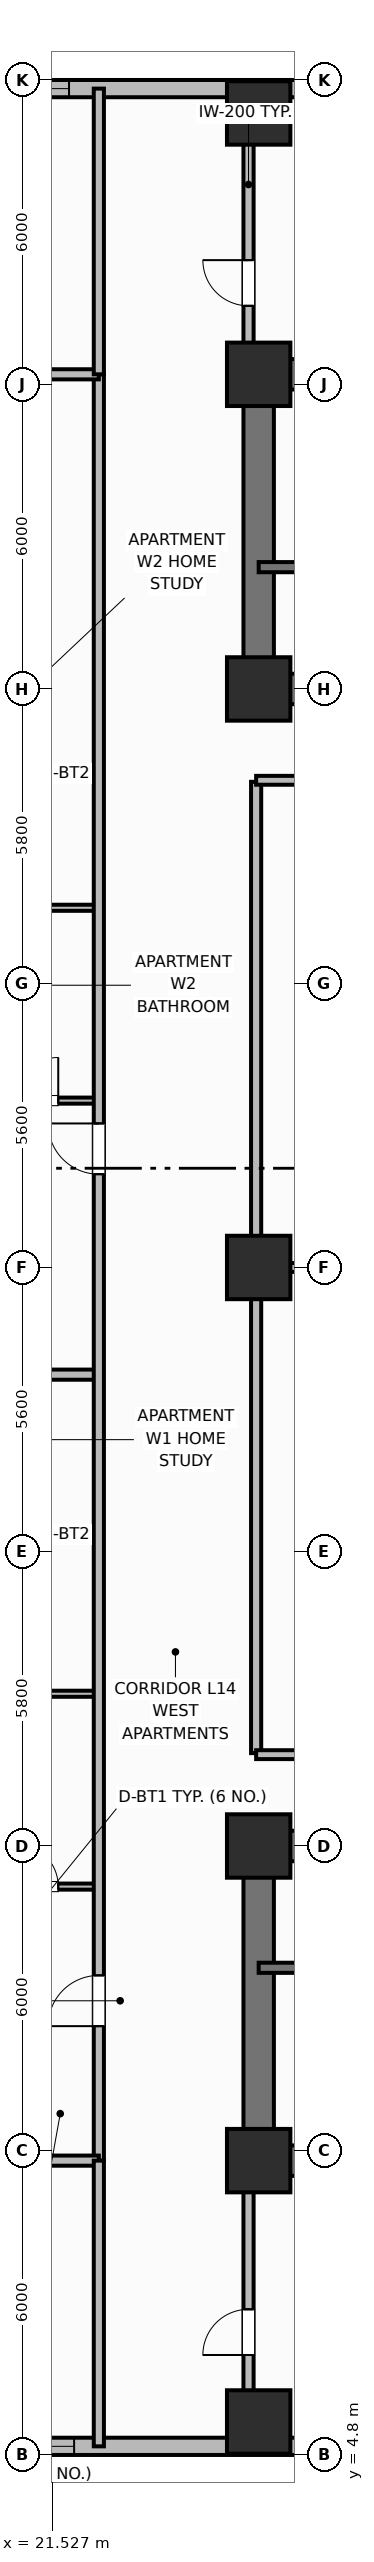
"""IFC4 building model, lengths in metres.
Left out: names, types, materials, properties, quantities, classifications, styles, units other than length and angle.
Written with IfcOpenShell. Run it as: python <this file> out.ifc"""

import sys

from ifc_helpers import new_model, si_unit, direction, frame, frame_2d, origin, origin_2d, place, context, subcontext, project, spatial, rectangle, extrude, element, fill, save


model = new_model("IFC4")
c1 = context("Model", 3, precision=1e-05, world=origin(), true_north=direction((0.0, 1.0)))
c2 = subcontext(c1, "Body", "Model", "MODEL_VIEW")
j1 = project(units=[si_unit("LENGTHUNIT", "METRE"), si_unit("PLANEANGLEUNIT", "RADIAN")], contexts=[c1])
p1 = place(None, origin())
s1 = spatial("IfcSite", under=j1, at=p1, CompositionType="ELEMENT")
p2 = place(p1, origin())
s2 = spatial("IfcBuilding", under=s1, at=p2, CompositionType="ELEMENT")
p3 = place(p2, frame((0.0, 0.0, 58.4)))
s3 = spatial("IfcBuildingStorey", under=s2, at=p3, CompositionType="ELEMENT", Elevation=58.4)
p4 = place(p3, frame((52.8, 10.6, 0.0), z_axis=(0.0, 0.0, 1.0), x_axis=(-1.0, 0.0, 0.0)))
e1 = element("IfcWall", 1, at=p4, inside=s3, PredefinedType="SHEAR", context=c2, shape_type="SweptSolid", body=[
    extrude(rectangle(XDim=27.2, YDim=0.6, at=frame_2d((13.6, 0.0))), origin(), (0.0, 0.0, 1.0), 3.7),
])
p5 = place(p3, frame((25.6, 10.9, 0.0), z_axis=(0.0, 0.0, 1.0), x_axis=(0.0, 1.0, 0.0)))
e2 = element("IfcWall", 2, at=p5, inside=s3, PredefinedType="SHEAR", context=c2, shape_type="SweptSolid", body=[
    extrude(rectangle(XDim=5.6, YDim=0.6, at=frame_2d((2.8, 0.0))), origin(), (0.0, 0.0, 1.0), 3.7),
])
p6 = place(p3, frame((25.6, 16.8, 0.0), z_axis=(0.0, 0.0, 1.0), x_axis=(1.0, 0.0, 0.0)))
e3 = element("IfcWall", 3, at=p6, inside=s3, PredefinedType="SHEAR", context=c2, shape_type="SweptSolid", body=[
    extrude(rectangle(XDim=27.2, YDim=0.6, at=frame_2d((13.6, 0.0))), origin(), (0.0, 0.0, 1.0), 3.7),
])
p7 = place(p6, frame((1.9, 0.0, 0.0)))
e4 = element("IfcOpeningElement", 4, at=p7, cuts=e3, PredefinedType="OPENING", context=c2, shape_type="SweptSolid", body=[
    extrude(rectangle(XDim=1.1, YDim=2.15, at=frame_2d((0.55, 1.075))), frame((0.0, 0.31, 0.0), z_axis=(0.0, -1.0, 0.0), x_axis=(1.0, 0.0, 0.0)), (0.0, 0.0, 1.0), 0.62),
])
p8 = place(p6, frame((13.0, 0.0, 0.0)))
e5 = element("IfcOpeningElement", 5, at=p8, cuts=e3, PredefinedType="OPENING", context=c2, shape_type="SweptSolid", body=[
    extrude(rectangle(XDim=1.2, YDim=2.15, at=frame_2d((0.6, 1.075))), frame((0.0, 0.31, 0.0), z_axis=(0.0, -1.0, 0.0), x_axis=(1.0, 0.0, 0.0)), (0.0, 0.0, 1.0), 0.62),
])
p9 = place(p6, frame((20.4, 0.0, 0.0)))
e6 = element("IfcOpeningElement", 6, at=p9, cuts=e3, PredefinedType="OPENING", context=c2, shape_type="SweptSolid", body=[
    extrude(rectangle(XDim=1.3, YDim=2.2, at=frame_2d((0.65, 1.1))), frame((0.0, 0.31, 0.0), z_axis=(0.0, -1.0, 0.0), x_axis=(1.0, 0.0, 0.0)), (0.0, 0.0, 1.0), 0.62),
])
p10 = place(p6, frame((24.65, 0.0, 0.0)))
e7 = element("IfcOpeningElement", 7, at=p10, cuts=e3, PredefinedType="OPENING", context=c2, shape_type="SweptSolid", body=[
    extrude(rectangle(XDim=0.85, YDim=2.1, at=frame_2d((0.425, 1.05))), frame((0.0, 0.31, 0.0), z_axis=(0.0, -1.0, 0.0), x_axis=(1.0, 0.0, 0.0)), (0.0, 0.0, 1.0), 0.62),
])
p11 = place(p3, frame((25.6, 45.8, 0.0), z_axis=(0.0, 0.0, 1.0), x_axis=(1.0, 0.0, 0.0)))
e8 = element("IfcWall", 8, at=p11, inside=s3, PredefinedType="SHEAR", context=c2, shape_type="SweptSolid", body=[
    extrude(rectangle(XDim=27.2, YDim=0.6, at=frame_2d((13.6, 0.0))), origin(), (0.0, 0.0, 1.0), 3.7),
])
p12 = place(p3, frame((25.6, 39.9, 0.0), z_axis=(0.0, 0.0, 1.0), x_axis=(0.0, 1.0, 0.0)))
e9 = element("IfcWall", 9, at=p12, inside=s3, PredefinedType="SHEAR", context=c2, shape_type="SweptSolid", body=[
    extrude(rectangle(XDim=5.6, YDim=0.6, at=frame_2d((2.8, 0.0))), origin(), (0.0, 0.0, 1.0), 3.7),
])
p13 = place(p3, frame((52.8, 39.6, 0.0), z_axis=(0.0, 0.0, 1.0), x_axis=(-1.0, 0.0, 0.0)))
e10 = element("IfcWall", 10, at=p13, inside=s3, PredefinedType="SHEAR", context=c2, shape_type="SweptSolid", body=[
    extrude(rectangle(XDim=27.2, YDim=0.6, at=frame_2d((13.6, 0.0))), origin(), (0.0, 0.0, 1.0), 3.7),
])
p14 = place(p13, frame((24.2, 0.0, 0.0)))
e11 = element("IfcOpeningElement", 11, at=p14, cuts=e10, PredefinedType="OPENING", context=c2, shape_type="SweptSolid", body=[
    extrude(rectangle(XDim=1.1, YDim=2.15, at=frame_2d((0.55, 1.075))), frame((0.0, 0.31, 0.0), z_axis=(0.0, -1.0, 0.0), x_axis=(1.0, 0.0, 0.0)), (0.0, 0.0, 1.0), 0.62),
])
p15 = place(p13, frame((15.1, 0.0, 0.0)))
e12 = element("IfcOpeningElement", 12, at=p15, cuts=e10, PredefinedType="OPENING", context=c2, shape_type="SweptSolid", body=[
    extrude(rectangle(XDim=1.2, YDim=2.15, at=frame_2d((0.6, 1.075))), frame((0.0, 0.31, 0.0), z_axis=(0.0, -1.0, 0.0), x_axis=(1.0, 0.0, 0.0)), (0.0, 0.0, 1.0), 0.62),
])
p16 = place(p13, frame((11.6, 0.0, 0.0)))
e13 = element("IfcOpeningElement", 13, at=p16, cuts=e10, PredefinedType="OPENING", context=c2, shape_type="SweptSolid", body=[
    extrude(rectangle(XDim=0.9, YDim=2.1, at=frame_2d((0.45, 1.05))), frame((0.0, 0.31, 0.0), z_axis=(0.0, -1.0, 0.0), x_axis=(1.0, 0.0, 0.0)), (0.0, 0.0, 1.0), 0.62),
])
p17 = place(p13, frame((3.6, 0.0, 0.0)))
e14 = element("IfcOpeningElement", 14, at=p17, cuts=e10, PredefinedType="OPENING", context=c2, shape_type="SweptSolid", body=[
    extrude(rectangle(XDim=1.0, YDim=2.15, at=frame_2d((0.5, 1.075))), frame((0.0, 0.31, 0.0), z_axis=(0.0, -1.0, 0.0), x_axis=(1.0, 0.0, 0.0)), (0.0, 0.0, 1.0), 0.62),
])
for number, where, z_axis, x_axis in (
    (15, (25.6, 10.6, 0.0), (0.0, 0.0, 1.0), (1.0, 0.0, 0.0)),
    (16, (25.6, 16.8, 0.0), (0.0, 0.0, 1.0), (1.0, 0.0, 0.0)),
    (17, (25.6, 39.6, 0.0), (0.0, 0.0, 1.0), (1.0, 0.0, 0.0)),
    (18, (25.6, 45.8, 0.0), (0.0, 0.0, 1.0), (1.0, 0.0, 0.0)),
    (19, (25.6, 28.2, 0.0), (0.0, 0.0, 1.0), (1.0, 0.0, 0.0)),
    (20, (25.6, 5.45, 0.0), (0.0, 0.0, 1.0), (1.0, 0.0, 0.0)),
    (21, (25.6, 50.95, 0.0), (0.0, 0.0, 1.0), (1.0, 0.0, 0.0)),
):
    element("IfcColumn", number, at=place(p3, frame(where, z_axis=z_axis, x_axis=x_axis)), inside=s3, PredefinedType="COLUMN", context=c2, shape_type="SweptSolid", body=[
        extrude(rectangle(XDim=1.25, YDim=1.25, at=origin_2d()), origin(), (0.0, 0.0, 1.0), 3.7),
    ])
p18 = place(p3, frame((18.6, 4.97, 0.0), z_axis=(0.0, 0.0, 1.0), x_axis=(1.0, 0.0, 0.0)))
e22 = element("IfcWall", 22, at=p18, inside=s3, PredefinedType="SOLIDWALL", context=c2, shape_type="SweptSolid", body=[
    extrude(rectangle(XDim=17.4, YDim=0.34, at=frame_2d((8.7, 0.0))), origin(), (0.0, 0.0, 1.0), 2.7),
])
p19 = place(p18, frame((1.262, 0.0, 0.68)))
e23 = element("IfcOpeningElement", 23, at=p19, cuts=e22, PredefinedType="OPENING", context=c2, shape_type="SweptSolid", body=[
    extrude(rectangle(XDim=2.1, YDim=1.9, at=frame_2d((1.05, 0.95))), frame((0.0, 0.18, 0.0), z_axis=(0.0, -1.0, 0.0), x_axis=(1.0, 0.0, 0.0)), (0.0, 0.0, 1.0), 0.36),
])
p20 = place(p18, frame((9.663, 0.0, 0.68)))
e24 = element("IfcOpeningElement", 24, at=p20, cuts=e22, PredefinedType="OPENING", context=c2, shape_type="SweptSolid", body=[
    extrude(rectangle(XDim=2.1, YDim=1.9, at=frame_2d((1.05, 0.95))), frame((0.0, 0.18, 0.0), z_axis=(0.0, -1.0, 0.0), x_axis=(1.0, 0.0, 0.0)), (0.0, 0.0, 1.0), 0.36),
])
p21 = place(p18, frame((12.988, 0.0, 0.68)))
e25 = element("IfcOpeningElement", 25, at=p21, cuts=e22, PredefinedType="OPENING", context=c2, shape_type="SweptSolid", body=[
    extrude(rectangle(XDim=2.1, YDim=1.9, at=frame_2d((1.05, 0.95))), frame((0.0, 0.18, 0.0), z_axis=(0.0, -1.0, 0.0), x_axis=(1.0, 0.0, 0.0)), (0.0, 0.0, 1.0), 0.36),
])
p22 = place(p3, frame((27.55, 51.43, 0.0), z_axis=(0.0, 0.0, 1.0), x_axis=(-1.0, 0.0, 0.0)))
e26 = element("IfcWall", 26, at=p22, inside=s3, PredefinedType="SOLIDWALL", context=c2, shape_type="SweptSolid", body=[
    extrude(rectangle(XDim=8.95, YDim=0.34, at=frame_2d((4.475, 0.0))), origin(), (0.0, 0.0, 1.0), 2.7),
])
p23 = place(p22, frame((5.688, 0.0, 0.73)))
e27 = element("IfcOpeningElement", 27, at=p23, cuts=e26, PredefinedType="OPENING", context=c2, shape_type="SweptSolid", body=[
    extrude(rectangle(XDim=1.4, YDim=1.85, at=frame_2d((0.7, 0.925))), frame((0.0, 0.18, 0.0), z_axis=(0.0, -1.0, 0.0), x_axis=(1.0, 0.0, 0.0)), (0.0, 0.0, 1.0), 0.36),
])
p24 = place(p3, frame((25.6, 14.4, 0.0), z_axis=(0.0, 0.0, 1.0), x_axis=(1.0, 0.0, 0.0)))
e28 = element("IfcWall", 28, at=p24, inside=s3, PredefinedType="SHEAR", context=c2, shape_type="SweptSolid", body=[
    extrude(rectangle(XDim=9.55, YDim=0.2, at=frame_2d((4.775, 0.0))), origin(), (0.0, 0.0, 1.0), 3.7),
])
p25 = place(p24, frame((1.05, 0.0, 0.0)))
e29 = element("IfcOpeningElement", 29, at=p25, cuts=e28, PredefinedType="OPENING", context=c2, shape_type="SweptSolid", body=[
    extrude(rectangle(XDim=1.1, YDim=2.15, at=frame_2d((0.55, 1.075))), frame((0.0, 0.11, 0.0), z_axis=(0.0, -1.0, 0.0), x_axis=(1.0, 0.0, 0.0)), (0.0, 0.0, 1.0), 0.22),
])
p26 = place(p3, frame((35.15, 42.0, 0.0), z_axis=(0.0, 0.0, 1.0), x_axis=(-1.0, 0.0, 0.0)))
e30 = element("IfcWall", 30, at=p26, inside=s3, PredefinedType="SHEAR", context=c2, shape_type="SweptSolid", body=[
    extrude(rectangle(XDim=9.55, YDim=0.2, at=frame_2d((4.775, 0.0))), origin(), (0.0, 0.0, 1.0), 3.7),
])
p27 = place(p26, frame((7.25, 0.0, 0.0)))
e31 = element("IfcOpeningElement", 31, at=p27, cuts=e30, PredefinedType="OPENING", context=c2, shape_type="SweptSolid", body=[
    extrude(rectangle(XDim=1.1, YDim=2.15, at=frame_2d((0.55, 1.075))), frame((0.0, 0.11, 0.0), z_axis=(0.0, -1.0, 0.0), x_axis=(1.0, 0.0, 0.0)), (0.0, 0.0, 1.0), 0.22),
])
p28 = place(p3, frame((25.55, 18.63, 0.0), z_axis=(0.0, 0.0, 1.0), x_axis=(0.0, 1.0, 0.0)))
e32 = element("IfcWall", 32, at=p28, inside=s3, PredefinedType="PARTITIONING", context=c2, shape_type="SweptSolid", body=[
    extrude(rectangle(XDim=19.14, YDim=0.2, at=frame_2d((9.57, 0.0))), origin(), (0.0, 0.0, 1.0), 2.53),
])
for number, where, z_axis, x_axis in (
    (33, (25.55, 18.6, 0.0), (0.0, 0.0, 1.0), (1.0, 0.0, 0.0)),
    (34, (25.55, 37.8, 0.0), (0.0, 0.0, 1.0), (1.0, 0.0, 0.0)),
):
    element("IfcWall", number, at=place(p3, frame(where, z_axis=z_axis, x_axis=x_axis)), inside=s3, PredefinedType="PARTITIONING", context=c2, shape_type="SweptSolid", body=[
        extrude(rectangle(XDim=14.9, YDim=0.175, at=frame_2d((7.45, 0.0))), origin(), (0.0, 0.0, 1.0), 2.53),
    ])
p29 = place(p3, frame((25.6, 28.2, 0.0), z_axis=(0.0, 0.0, 1.0), x_axis=(1.0, 0.0, 0.0)))
e35 = element("IfcWall", 35, at=p29, inside=s3, PredefinedType="PARTITIONING", context=c2, shape_type="SweptSolid", body=[
    extrude(rectangle(XDim=14.87, YDim=0.175, at=frame_2d((7.435, 0.0))), origin(), (0.0, 0.0, 1.0), 2.53),
])
p30 = place(p3, frame((20.2, 16.0, 0.0), z_axis=(0.0, 0.0, 1.0), x_axis=(1.0, 0.0, 0.0)))
e36 = element("IfcWall", 36, at=p30, inside=s3, PredefinedType="PARTITIONING", context=c2, shape_type="SweptSolid", body=[
    extrude(rectangle(XDim=2.25, YDim=0.12, at=frame_2d((1.125, 0.0))), origin(), (0.0, 0.0, 1.0), 2.53),
])
p31 = place(p30, frame((0.6, 0.0, 0.0)))
e37 = element("IfcOpeningElement", 37, at=p31, cuts=e36, PredefinedType="OPENING", context=c2, shape_type="SweptSolid", body=[
    extrude(rectangle(XDim=0.85, YDim=2.1, at=frame_2d((0.425, 1.05))), frame((0.0, 0.07, 0.0), z_axis=(0.0, -1.0, 0.0), x_axis=(1.0, 0.0, 0.0)), (0.0, 0.0, 1.0), 0.14),
])
p32 = place(p3, frame((20.2, 19.8, 0.0), z_axis=(0.0, 0.0, 1.0), x_axis=(1.0, 0.0, 0.0)))
e38 = element("IfcWall", 38, at=p32, inside=s3, PredefinedType="PARTITIONING", context=c2, shape_type="SweptSolid", body=[
    extrude(rectangle(XDim=2.25, YDim=0.12, at=frame_2d((1.125, 0.0))), origin(), (0.0, 0.0, 1.0), 2.53),
])
p33 = place(p3, frame((15.226, 26.088, 0.0), z_axis=(0.0, 0.0, 1.0), x_axis=(1.0, 0.0, 0.0)))
e39 = element("IfcWall", 39, at=p33, inside=s3, PredefinedType="PARTITIONING", context=c2, shape_type="SweptSolid", body=[
    extrude(rectangle(XDim=7.224, YDim=0.2, at=frame_2d((3.612, 0.0))), origin(), (0.0, 0.0, 1.0), 2.53),
])
p34 = place(p3, frame((20.2, 31.488, 0.0), z_axis=(0.0, 0.0, 1.0), x_axis=(1.0, 0.0, 0.0)))
e40 = element("IfcWall", 40, at=p34, inside=s3, PredefinedType="PARTITIONING", context=c2, shape_type="SweptSolid", body=[
    extrude(rectangle(XDim=2.25, YDim=0.12, at=frame_2d((1.125, 0.0))), origin(), (0.0, 0.0, 1.0), 2.53),
])
p35 = place(p34, frame((0.6, 0.0, 0.0)))
e41 = element("IfcOpeningElement", 41, at=p35, cuts=e40, PredefinedType="OPENING", context=c2, shape_type="SweptSolid", body=[
    extrude(rectangle(XDim=0.85, YDim=2.1, at=frame_2d((0.425, 1.05))), frame((0.0, 0.07, 0.0), z_axis=(0.0, -1.0, 0.0), x_axis=(1.0, 0.0, 0.0)), (0.0, 0.0, 1.0), 0.14),
])
p36 = place(p3, frame((20.2, 35.288, 0.0), z_axis=(0.0, 0.0, 1.0), x_axis=(1.0, 0.0, 0.0)))
e42 = element("IfcWall", 42, at=p36, inside=s3, PredefinedType="PARTITIONING", context=c2, shape_type="SweptSolid", body=[
    extrude(rectangle(XDim=2.25, YDim=0.12, at=frame_2d((1.125, 0.0))), origin(), (0.0, 0.0, 1.0), 2.53),
])
p37 = place(p3, frame((22.45, 10.6, 0.0), z_axis=(0.0, 0.0, 1.0), x_axis=(0.0, 1.0, 0.0)))
e43 = element("IfcWall", 43, at=p37, inside=s3, PredefinedType="PARTITIONING", context=c2, shape_type="SweptSolid", body=[
    extrude(rectangle(XDim=35.2, YDim=0.2, at=frame_2d((17.6, 0.0))), origin(), (0.0, 0.0, 1.0), 2.53),
])
p38 = place(p37, frame((2.65, 0.0, 0.0)))
e44 = element("IfcOpeningElement", 44, at=p38, cuts=e43, PredefinedType="OPENING", context=c2, shape_type="SweptSolid", body=[
    extrude(rectangle(XDim=1.0, YDim=2.15, at=frame_2d((0.5, 1.075))), frame((0.0, 0.11, 0.0), z_axis=(0.0, -1.0, 0.0), x_axis=(1.0, 0.0, 0.0)), (0.0, 0.0, 1.0), 0.22),
])
p39 = place(p37, frame((19.438, 0.0, 0.0)))
e45 = element("IfcOpeningElement", 45, at=p39, cuts=e43, PredefinedType="OPENING", context=c2, shape_type="SweptSolid", body=[
    extrude(rectangle(XDim=1.0, YDim=2.15, at=frame_2d((0.5, 1.075))), frame((0.0, 0.11, 0.0), z_axis=(0.0, -1.0, 0.0), x_axis=(1.0, 0.0, 0.0)), (0.0, 0.0, 1.0), 0.22),
])
for number, where, z_axis, x_axis in (
    (46, (14.99, 10.6, 0.0), (0.0, 0.0, 1.0), (1.0, 0.0, 0.0)),
    (47, (14.99, 45.8, 0.0), (0.0, 0.0, 1.0), (1.0, 0.0, 0.0)),
):
    element("IfcWall", number, at=place(p3, frame(where, z_axis=z_axis, x_axis=x_axis)), inside=s3, PredefinedType="PARTITIONING", context=c2, shape_type="SweptSolid", body=[
        extrude(rectangle(XDim=7.46, YDim=0.2, at=frame_2d((3.73, 0.0))), origin(), (0.0, 0.0, 1.0), 2.53),
    ])
p40 = place(p3, frame((22.45, 4.97, 0.0), z_axis=(0.0, 0.0, 1.0), x_axis=(0.0, 1.0, 0.0)))
e48 = element("IfcWall", 48, at=p40, inside=s3, PredefinedType="PARTITIONING", context=c2, shape_type="SweptSolid", body=[
    extrude(rectangle(XDim=5.63, YDim=0.2, at=frame_2d((2.815, 0.0))), origin(), (0.0, 0.0, 1.0), 2.53),
])
p41 = place(p3, frame((22.45, 45.8, 0.0), z_axis=(0.0, 0.0, 1.0), x_axis=(0.0, 1.0, 0.0)))
e49 = element("IfcWall", 49, at=p41, inside=s3, PredefinedType="PARTITIONING", context=c2, shape_type="SweptSolid", body=[
    extrude(rectangle(XDim=5.63, YDim=0.2, at=frame_2d((2.815, 0.0))), origin(), (0.0, 0.0, 1.0), 2.53),
])
p42 = place(p3, frame((25.4, 5.72, 0.0), z_axis=(0.0, 0.0, 1.0), x_axis=(0.0, 1.0, 0.0)))
e50 = element("IfcWall", 50, at=p42, inside=s3, PredefinedType="PARTITIONING", context=c2, shape_type="SweptSolid", body=[
    extrude(rectangle(XDim=4.58, YDim=0.2, at=frame_2d((2.29, 0.0))), origin(), (0.0, 0.0, 1.0), 2.53),
])
p43 = place(p42, frame((1.05, 0.0, 0.0)))
e51 = element("IfcOpeningElement", 51, at=p43, cuts=e50, PredefinedType="OPENING", context=c2, shape_type="SweptSolid", body=[
    extrude(rectangle(XDim=0.9, YDim=2.1, at=frame_2d((0.45, 1.05))), frame((0.0, 0.11, 0.0), z_axis=(0.0, -1.0, 0.0), x_axis=(1.0, 0.0, 0.0)), (0.0, 0.0, 1.0), 0.22),
])
p44 = place(p3, frame((25.4, 46.1, 0.0), z_axis=(0.0, 0.0, 1.0), x_axis=(0.0, 1.0, 0.0)))
e52 = element("IfcWall", 52, at=p44, inside=s3, PredefinedType="PARTITIONING", context=c2, shape_type="SweptSolid", body=[
    extrude(rectangle(XDim=4.58, YDim=0.2, at=frame_2d((2.29, 0.0))), origin(), (0.0, 0.0, 1.0), 2.53),
])
p45 = place(p44, frame((1.05, 0.0, 0.0)))
e53 = element("IfcOpeningElement", 53, at=p45, cuts=e52, PredefinedType="OPENING", context=c2, shape_type="SweptSolid", body=[
    extrude(rectangle(XDim=0.9, YDim=2.1, at=frame_2d((0.45, 1.05))), frame((0.0, 0.11, 0.0), z_axis=(0.0, -1.0, 0.0), x_axis=(1.0, 0.0, 0.0)), (0.0, 0.0, 1.0), 0.22),
])
p46 = place(p19, origin())
e54 = element("IfcWindow", 54, at=p46, inside=s3, PartitioningType="SINGLE_PANEL", PredefinedType="WINDOW", context=c2, shape_type="SweptSolid", body=[
    extrude(rectangle(XDim=2.1, YDim=1.9, at=frame_2d((1.05, 0.95))), frame((0.0, 0.03, 0.0), z_axis=(0.0, -1.0, 0.0), x_axis=(1.0, 0.0, 0.0)), (0.0, 0.0, 1.0), 0.06),
])
fill(e23, e54)
p47 = place(p23, origin())
e55 = element("IfcWindow", 55, at=p47, inside=s3, PartitioningType="SINGLE_PANEL", PredefinedType="WINDOW", context=c2, shape_type="SweptSolid", body=[
    extrude(rectangle(XDim=1.4, YDim=1.85, at=frame_2d((0.7, 0.925))), frame((0.0, 0.03, 0.0), z_axis=(0.0, -1.0, 0.0), x_axis=(1.0, 0.0, 0.0)), (0.0, 0.0, 1.0), 0.06),
])
fill(e27, e55)
p48 = place(p31, origin())
e56 = element("IfcDoor", 56, at=p48, inside=s3, OperationType="SINGLE_SWING_LEFT", PredefinedType="DOOR", context=c2, shape_type="SweptSolid", body=[
    extrude(rectangle(XDim=0.85, YDim=2.1, at=frame_2d((0.425, 1.05))), frame((0.0, 0.025, 0.0), z_axis=(0.0, -1.0, 0.0), x_axis=(1.0, 0.0, 0.0)), (0.0, 0.0, 1.0), 0.05),
])
fill(e37, e56)
p49 = place(p35, origin())
e57 = element("IfcDoor", 57, at=p49, inside=s3, OperationType="SINGLE_SWING_RIGHT", PredefinedType="DOOR", context=c2, shape_type="SweptSolid", body=[
    extrude(rectangle(XDim=0.85, YDim=2.1, at=frame_2d((0.425, 1.05))), frame((0.0, 0.025, 0.0), z_axis=(0.0, -1.0, 0.0), x_axis=(1.0, 0.0, 0.0)), (0.0, 0.0, 1.0), 0.05),
])
fill(e41, e57)
p50 = place(p38, origin())
e58 = element("IfcDoor", 58, at=p50, inside=s3, OperationType="SINGLE_SWING_LEFT", PredefinedType="DOOR", context=c2, shape_type="SweptSolid", body=[
    extrude(rectangle(XDim=1.0, YDim=2.15, at=frame_2d((0.5, 1.075))), frame((0.0, 0.025, 0.0), z_axis=(0.0, -1.0, 0.0), x_axis=(1.0, 0.0, 0.0)), (0.0, 0.0, 1.0), 0.05),
])
fill(e44, e58)
p51 = place(p39, origin())
e59 = element("IfcDoor", 59, at=p51, inside=s3, OperationType="SINGLE_SWING_RIGHT", PredefinedType="DOOR", context=c2, shape_type="SweptSolid", body=[
    extrude(rectangle(XDim=1.0, YDim=2.15, at=frame_2d((0.5, 1.075))), frame((0.0, 0.025, 0.0), z_axis=(0.0, -1.0, 0.0), x_axis=(1.0, 0.0, 0.0)), (0.0, 0.0, 1.0), 0.05),
])
fill(e45, e59)
p52 = place(p43, origin())
e60 = element("IfcDoor", 60, at=p52, inside=s3, OperationType="SINGLE_SWING_LEFT", PredefinedType="DOOR", context=c2, shape_type="SweptSolid", body=[
    extrude(rectangle(XDim=0.9, YDim=2.1, at=frame_2d((0.45, 1.05))), frame((0.0, 0.025, 0.0), z_axis=(0.0, -1.0, 0.0), x_axis=(1.0, 0.0, 0.0)), (0.0, 0.0, 1.0), 0.05),
])
fill(e51, e60)
p53 = place(p45, origin())
e61 = element("IfcDoor", 61, at=p53, inside=s3, OperationType="SINGLE_SWING_RIGHT", PredefinedType="DOOR", context=c2, shape_type="SweptSolid", body=[
    extrude(rectangle(XDim=0.9, YDim=2.1, at=frame_2d((0.45, 1.05))), frame((0.0, 0.025, 0.0), z_axis=(0.0, -1.0, 0.0), x_axis=(1.0, 0.0, 0.0)), (0.0, 0.0, 1.0), 0.05),
])
fill(e53, e61)
save(model, sys.argv[1])
